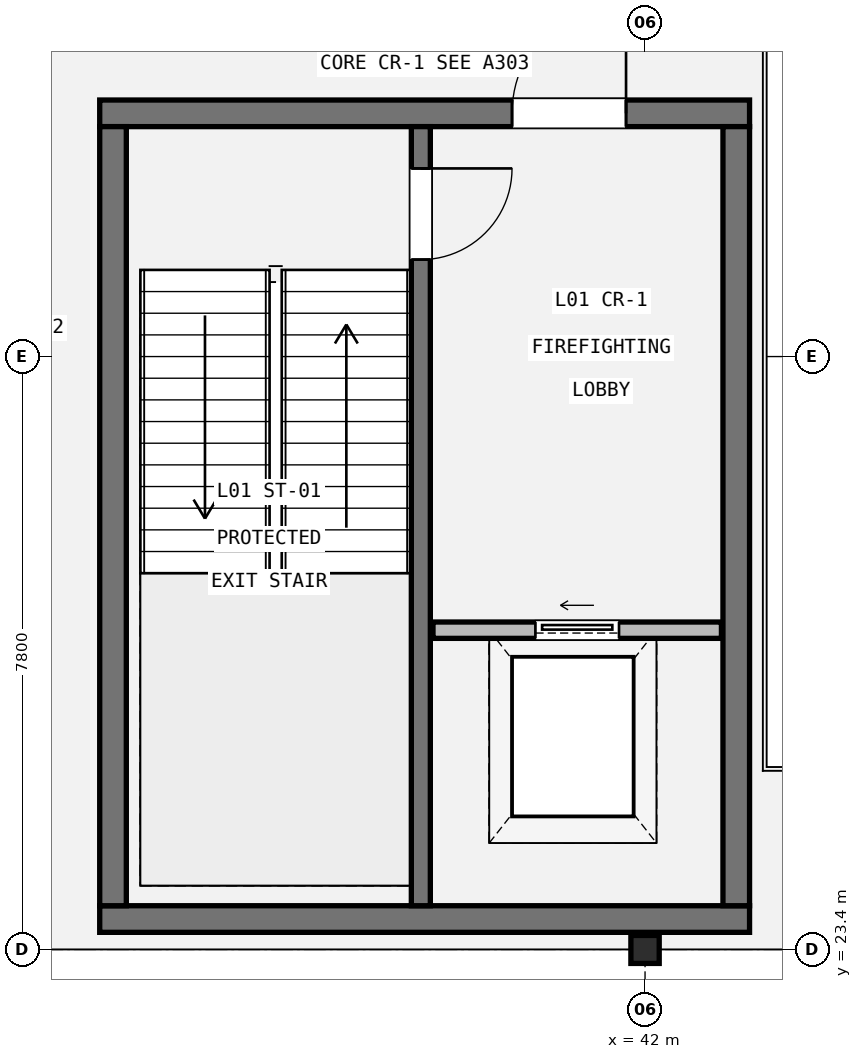
"""IFC4 building model, lengths in metres.
Left out: names, types, materials, properties, quantities, classifications, styles, units other than length and angle.
Written with IfcOpenShell. Run it as: python <this file> out.ifc"""

import sys

from ifc_helpers import new_model, si_unit, direction, frame, frame_2d, origin, origin_2d, place, context, subcontext, project, spatial, rectangle, i_section, extrude, element, fill, save


model = new_model("IFC4")
c1 = context("Model", 3, precision=1e-05, world=origin(), true_north=direction((0.0, 1.0)))
c2 = subcontext(c1, "Body", "Model", "MODEL_VIEW")
j1 = project(units=[si_unit("LENGTHUNIT", "METRE"), si_unit("PLANEANGLEUNIT", "RADIAN")], contexts=[c1])
p1 = place(None, origin())
s1 = spatial("IfcSite", under=j1, at=p1, CompositionType="ELEMENT")
p2 = place(p1, origin())
s2 = spatial("IfcBuilding", under=s1, at=p2, CompositionType="ELEMENT")
p3 = place(p2, frame((0.0, 0.0, 5.4)))
s3 = spatial("IfcBuildingStorey", under=s2, at=p3, CompositionType="ELEMENT", Elevation=5.4)
p4 = place(p3, frame((42.0, 23.4, 0.0), z_axis=(0.0, 0.0, 1.0), x_axis=(1.0, 0.0, 0.0)))
e1 = element("IfcColumn", 1, at=p4, inside=s3, PredefinedType="COLUMN", context=c2, shape_type="SweptSolid", body=[
    extrude(i_section(OverallWidth=0.373, OverallDepth=0.368, WebThickness=0.014, FlangeThickness=0.024, FilletRadius=0.015, at=origin_2d()), origin(), (0.0, 0.0, 1.0), 4.8),
])
p5 = place(p3, frame((43.375, 23.8, 0.0), z_axis=(0.0, 0.0, 1.0), x_axis=(-1.0, 0.0, 0.0)))
e2 = element("IfcWall", 2, at=p5, inside=s3, PredefinedType="SHEAR", context=c2, shape_type="SweptSolid", body=[
    extrude(rectangle(XDim=8.55, YDim=0.35, at=frame_2d((4.275, 0.0))), origin(), (0.0, 0.0, 1.0), 4.58),
])
p6 = place(p3, frame((34.825, 34.4, 0.0), z_axis=(0.0, 0.0, 1.0), x_axis=(1.0, 0.0, 0.0)))
e3 = element("IfcWall", 3, at=p6, inside=s3, PredefinedType="SHEAR", context=c2, shape_type="SweptSolid", body=[
    extrude(rectangle(XDim=8.55, YDim=0.35, at=frame_2d((4.275, 0.0))), origin(), (0.0, 0.0, 1.0), 4.58),
])
p7 = place(p6, frame((5.425, 0.0, 0.0)))
e4 = element("IfcOpeningElement", 4, at=p7, cuts=e3, PredefinedType="OPENING", context=c2, shape_type="SweptSolid", body=[
    extrude(rectangle(XDim=1.5, YDim=2.15, at=frame_2d((0.75, 1.075))), frame((0.0, 0.185, 0.0), z_axis=(0.0, -1.0, 0.0), x_axis=(1.0, 0.0, 0.0)), (0.0, 0.0, 1.0), 0.37),
])
for number, where, z_axis, x_axis in (
    (5, (35.0, 23.975, 0.0), (0.0, 0.0, 1.0), (0.0, 1.0, 0.0)),
    (6, (43.2, 34.225, 0.0), (0.0, 0.0, 1.0), (0.0, -1.0, 0.0)),
):
    element("IfcWall", number, at=place(p3, frame(where, z_axis=z_axis, x_axis=x_axis)), inside=s3, PredefinedType="SHEAR", context=c2, shape_type="SweptSolid", body=[
        extrude(rectangle(XDim=10.25, YDim=0.35, at=frame_2d((5.125, 0.0))), origin(), (0.0, 0.0, 1.0), 4.58),
    ])
p8 = place(p3, frame((39.05, 34.225, 0.0), z_axis=(0.0, 0.0, 1.0), x_axis=(0.0, -1.0, 0.0)))
e7 = element("IfcWall", 7, at=p8, inside=s3, PredefinedType="SHEAR", context=c2, shape_type="SweptSolid", body=[
    extrude(rectangle(XDim=10.25, YDim=0.25, at=frame_2d((5.125, 0.0))), origin(), (0.0, 0.0, 1.0), 4.58),
])
p9 = place(p8, frame((0.55, 0.0, 0.0)))
e8 = element("IfcOpeningElement", 8, at=p9, cuts=e7, PredefinedType="OPENING", context=c2, shape_type="SweptSolid", body=[
    extrude(rectangle(XDim=1.2, YDim=2.15, at=frame_2d((0.6, 1.075))), frame((0.0, 0.135, 0.0), z_axis=(0.0, -1.0, 0.0), x_axis=(1.0, 0.0, 0.0)), (0.0, 0.0, 1.0), 0.27),
])
p10 = place(p3, frame((39.21, 27.6, 0.0), z_axis=(0.0, 0.0, 1.0), x_axis=(1.0, 0.0, 0.0)))
e9 = element("IfcWall", 9, at=p10, inside=s3, PredefinedType="STANDARD", context=c2, shape_type="SweptSolid", body=[
    extrude(rectangle(XDim=3.795, YDim=0.215, at=frame_2d((1.897, 0.0))), origin(), (0.0, 0.0, 1.0), 4.572),
])
p11 = place(p10, frame((1.347, 0.0, 0.0)))
e10 = element("IfcOpeningElement", 10, at=p11, cuts=e9, PredefinedType="OPENING", context=c2, shape_type="SweptSolid", body=[
    extrude(rectangle(XDim=1.1, YDim=2.2, at=frame_2d((0.55, 1.1))), frame((0.0, 0.117, 0.0), z_axis=(0.0, -1.0, 0.0), x_axis=(1.0, 0.0, 0.0)), (0.0, 0.0, 1.0), 0.235),
])
p12 = place(p9, origin())
e11 = element("IfcDoor", 11, at=p12, inside=s3, OperationType="SINGLE_SWING_LEFT", PredefinedType="DOOR", context=c2, shape_type="SweptSolid", body=[
    extrude(rectangle(XDim=1.2, YDim=2.15, at=frame_2d((0.6, 1.075))), frame((0.0, 0.025, 0.0), z_axis=(0.0, -1.0, 0.0), x_axis=(1.0, 0.0, 0.0)), (0.0, 0.0, 1.0), 0.05),
])
fill(e8, e11)
p13 = place(p7, origin())
e12 = element("IfcDoor", 12, at=p13, inside=s3, OperationType="SINGLE_SWING_RIGHT", PredefinedType="DOOR", context=c2, shape_type="SweptSolid", body=[
    extrude(rectangle(XDim=1.5, YDim=2.15, at=frame_2d((0.75, 1.075))), frame((0.0, 0.025, 0.0), z_axis=(0.0, -1.0, 0.0), x_axis=(1.0, 0.0, 0.0)), (0.0, 0.0, 1.0), 0.05),
])
fill(e4, e12)
p14 = place(p11, origin())
e13 = element("IfcDoor", 13, at=p14, inside=s3, OperationType="SLIDING_TO_LEFT", PredefinedType="DOOR", context=c2, shape_type="SweptSolid", body=[
    extrude(rectangle(XDim=1.1, YDim=2.2, at=frame_2d((0.55, 1.1))), frame((0.0, 0.025, 0.0), z_axis=(0.0, -1.0, 0.0), x_axis=(1.0, 0.0, 0.0)), (0.0, 0.0, 1.0), 0.05),
])
fill(e10, e13)
save(model, sys.argv[1])
